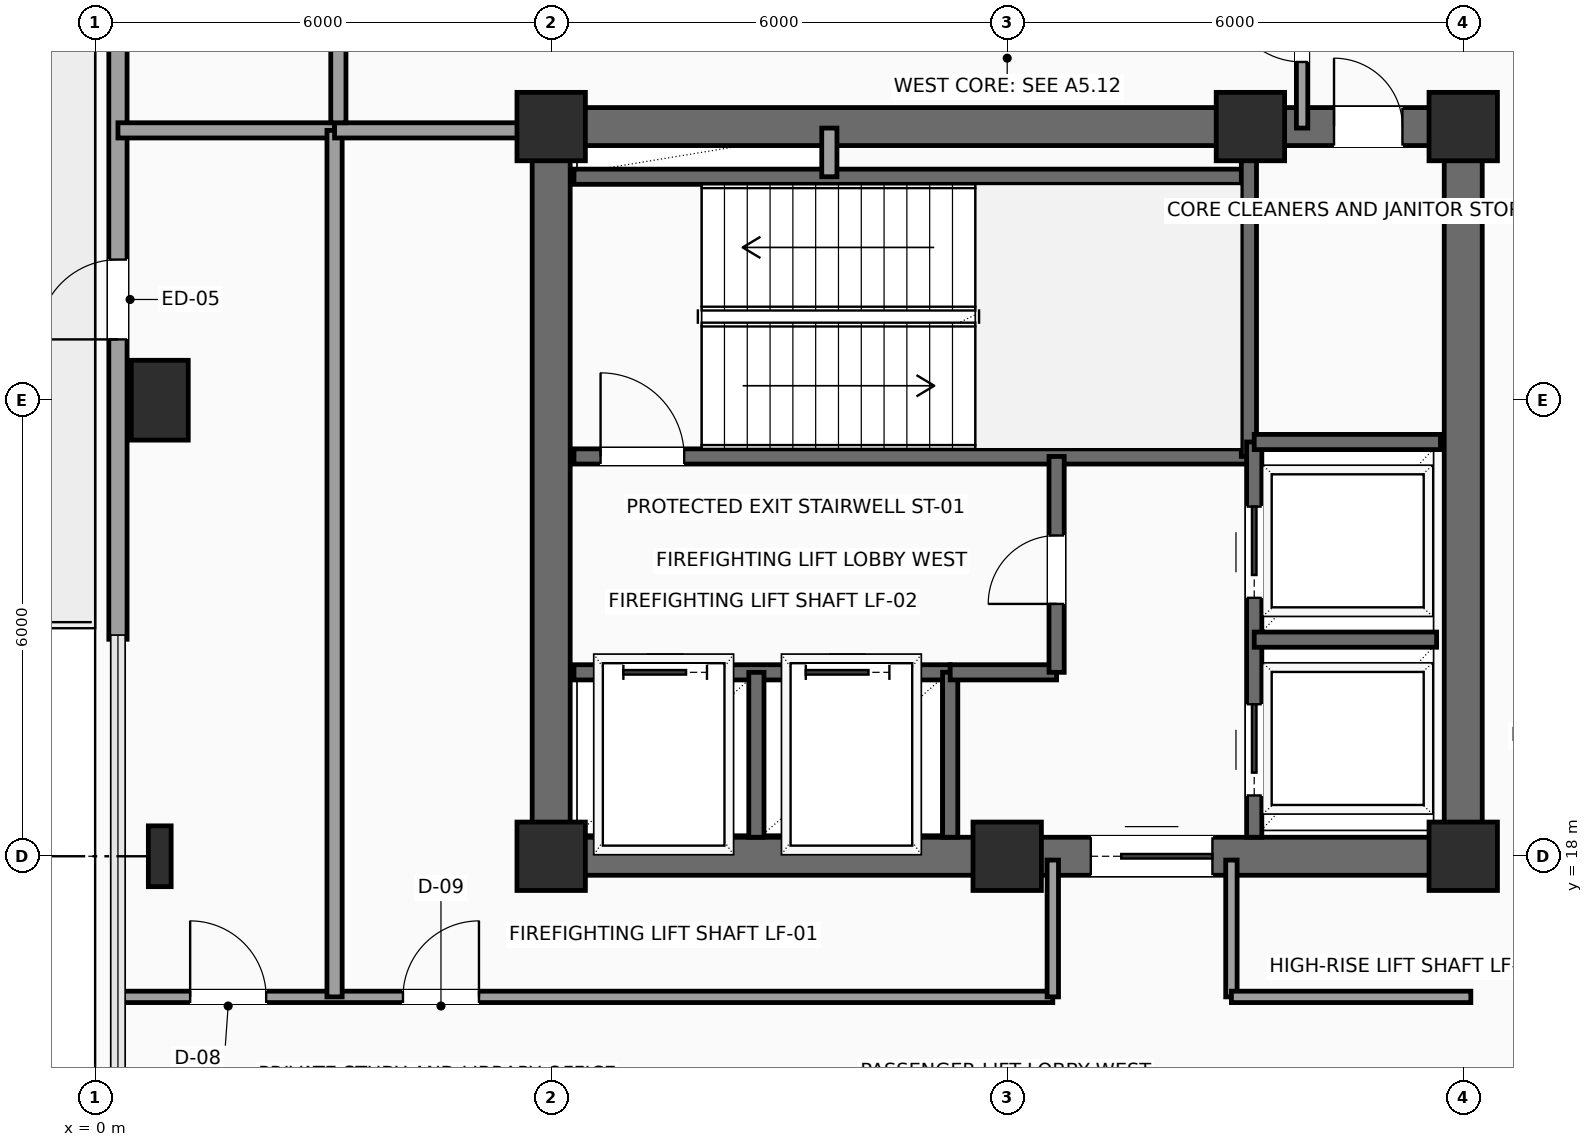
"""IFC4 building model, lengths in metres.
Left out: names, types, materials, properties, quantities, classifications, styles, units other than length and angle.
Written with IfcOpenShell. Run it as: python <this file> out.ifc"""

import sys

from ifc_helpers import new_model, si_unit, direction, frame, frame_2d, origin, origin_2d, place, context, subcontext, project, spatial, rectangle, i_section, extrude, element, fill, save


model = new_model("IFC4")
c1 = context("Model", 3, precision=1e-05, world=origin(), true_north=direction((0.0, 1.0)))
c2 = subcontext(c1, "Body", "Model", "MODEL_VIEW")
j1 = project(units=[si_unit("LENGTHUNIT", "METRE"), si_unit("PLANEANGLEUNIT", "RADIAN")], contexts=[c1])
p1 = place(None, origin())
s1 = spatial("IfcSite", under=j1, at=p1, CompositionType="ELEMENT")
p2 = place(p1, origin())
s2 = spatial("IfcBuilding", under=s1, at=p2, CompositionType="ELEMENT")
p3 = place(p2, frame((0.0, 0.0, 227.4)))
s3 = spatial("IfcBuildingStorey", under=s2, at=p3, CompositionType="ELEMENT", Elevation=227.4)
for number, where, z_axis, x_axis in (
    (1, (6.0, 18.0, 0.0), (0.0, 0.0, 1.0), (1.0, 0.0, 0.0)),
    (2, (12.0, 18.0, 0.0), (0.0, 0.0, 1.0), (1.0, 0.0, 0.0)),
    (3, (18.0, 18.0, 0.0), (0.0, 0.0, 1.0), (1.0, 0.0, 0.0)),
    (4, (6.0, 27.6, 0.0), (0.0, 0.0, 1.0), (1.0, 0.0, 0.0)),
    (5, (15.2, 27.6, 0.0), (0.0, 0.0, 1.0), (1.0, 0.0, 0.0)),
    (6, (18.0, 27.6, 0.0), (0.0, 0.0, 1.0), (1.0, 0.0, 0.0)),
):
    element("IfcColumn", number, at=place(p3, frame(where, z_axis=z_axis, x_axis=x_axis)), inside=s3, PredefinedType="COLUMN", context=c2, shape_type="SweptSolid", body=[
        extrude(rectangle(XDim=0.9, YDim=0.9, at=origin_2d()), origin(), (0.0, 0.0, 1.0), 3.75),
    ])
p4 = place(p3, frame((0.85, 18.0, 0.0), z_axis=(0.0, 0.0, 1.0), x_axis=(1.0, 0.0, 0.0)))
e7 = element("IfcColumn", 7, at=p4, inside=s3, PredefinedType="COLUMN", context=c2, shape_type="SweptSolid", body=[
    extrude(i_section(OverallWidth=0.3, OverallDepth=0.8, WebThickness=0.018, FlangeThickness=0.033, FilletRadius=0.03, at=origin_2d()), origin(), (0.0, 0.0, 1.0), 3.75),
])
p5 = place(p3, frame((0.85, 24.0, 0.0), z_axis=(0.0, 0.0, 1.0), x_axis=(1.0, 0.0, 0.0)))
e8 = element("IfcColumn", 8, at=p5, inside=s3, PredefinedType="COLUMN", context=c2, shape_type="SweptSolid", body=[
    extrude(rectangle(XDim=0.75, YDim=1.05, at=origin_2d()), origin(), (0.0, 0.0, 1.0), 3.75),
])
p6 = place(p3, frame((0.3, 20.855, 0.0), z_axis=(0.0, 0.0, 1.0), x_axis=(0.0, 1.0, 0.0)))
e9 = element("IfcWall", 9, at=p6, inside=s3, PredefinedType="SOLIDWALL", context=c2, shape_type="SweptSolid", body=[
    extrude(rectangle(XDim=9.29, YDim=0.24, at=frame_2d((4.645, 0.0))), origin(), (0.0, 0.0, 1.0), 3.54),
])
p7 = place(p6, frame((3.945, 0.0, 0.0)))
e10 = element("IfcOpeningElement", 10, at=p7, cuts=e9, PredefinedType="OPENING", context=c2, shape_type="SweptSolid", body=[
    extrude(rectangle(XDim=1.05, YDim=2.2, at=frame_2d((0.525, 1.1))), frame((0.0, 0.13, 0.0), z_axis=(0.0, -1.0, 0.0), x_axis=(1.0, 0.0, 0.0)), (0.0, 0.0, 1.0), 0.26),
])
p8 = place(p3, frame((6.0, 18.0, 0.0), z_axis=(0.0, 0.0, 1.0), x_axis=(1.0, 0.0, 0.0)))
e11 = element("IfcWall", 11, at=p8, inside=s3, PredefinedType="SHEAR", context=c2, shape_type="SweptSolid", body=[
    extrude(rectangle(XDim=12.0, YDim=0.5, at=frame_2d((6.0, 0.0))), origin(), (0.0, 0.0, 1.0), 3.54),
])
p9 = place(p8, frame((7.1, 0.0, 0.0)))
e12 = element("IfcOpeningElement", 12, at=p9, cuts=e11, PredefinedType="OPENING", context=c2, shape_type="SweptSolid", body=[
    extrude(rectangle(XDim=1.6, YDim=2.3, at=frame_2d((0.8, 1.15))), frame((0.0, 0.26, 0.0), z_axis=(0.0, -1.0, 0.0), x_axis=(1.0, 0.0, 0.0)), (0.0, 0.0, 1.0), 0.52),
])
p10 = place(p3, frame((6.0, 27.6, 0.0), z_axis=(0.0, 0.0, 1.0), x_axis=(1.0, 0.0, 0.0)))
e13 = element("IfcWall", 13, at=p10, inside=s3, PredefinedType="SHEAR", context=c2, shape_type="SweptSolid", body=[
    extrude(rectangle(XDim=12.0, YDim=0.5, at=frame_2d((6.0, 0.0))), origin(), (0.0, 0.0, 1.0), 3.54),
])
p11 = place(p10, frame((10.3, 0.0, 0.0)))
e14 = element("IfcOpeningElement", 14, at=p11, cuts=e13, PredefinedType="OPENING", context=c2, shape_type="SweptSolid", body=[
    extrude(rectangle(XDim=0.9, YDim=2.15, at=frame_2d((0.45, 1.075))), frame((0.0, 0.26, 0.0), z_axis=(0.0, -1.0, 0.0), x_axis=(1.0, 0.0, 0.0)), (0.0, 0.0, 1.0), 0.52),
])
for number, where, z_axis, x_axis in (
    (15, (6.0, 18.0, 0.0), (0.0, 0.0, 1.0), (0.0, 1.0, 0.0)),
    (16, (18.0, 18.0, 0.0), (0.0, 0.0, 1.0), (0.0, 1.0, 0.0)),
):
    element("IfcWall", number, at=place(p3, frame(where, z_axis=z_axis, x_axis=x_axis)), inside=s3, PredefinedType="SHEAR", context=c2, shape_type="SweptSolid", body=[
        extrude(rectangle(XDim=9.6, YDim=0.5, at=frame_2d((4.8, 0.0))), origin(), (0.0, 0.0, 1.0), 3.54),
    ])
p12 = place(p3, frame((6.3, 23.26, 0.0), z_axis=(0.0, 0.0, 1.0), x_axis=(1.0, 0.0, 0.0)))
e17 = element("IfcWall", 17, at=p12, inside=s3, PredefinedType="SHEAR", context=c2, shape_type="SweptSolid", body=[
    extrude(rectangle(XDim=8.88, YDim=0.2, at=frame_2d((4.44, 0.0))), origin(), (0.0, 0.0, 1.0), 3.54),
])
p13 = place(p12, frame((0.35, 0.0, 0.0)))
e18 = element("IfcOpeningElement", 18, at=p13, cuts=e17, PredefinedType="OPENING", context=c2, shape_type="SweptSolid", body=[
    extrude(rectangle(XDim=1.1, YDim=2.2, at=frame_2d((0.55, 1.1))), frame((0.0, 0.11, 0.0), z_axis=(0.0, -1.0, 0.0), x_axis=(1.0, 0.0, 0.0)), (0.0, 0.0, 1.0), 0.22),
])
p14 = place(p3, frame((6.3, 26.94, 0.0), z_axis=(0.0, 0.0, 1.0), x_axis=(1.0, 0.0, 0.0)))
e19 = element("IfcWall", 19, at=p14, inside=s3, PredefinedType="SHEAR", context=c2, shape_type="SweptSolid", body=[
    extrude(rectangle(XDim=8.88, YDim=0.2, at=frame_2d((4.44, 0.0))), origin(), (0.0, 0.0, 1.0), 3.54),
])
p15 = place(p3, frame((15.18, 23.26, 0.0), z_axis=(0.0, 0.0, 1.0), x_axis=(0.0, 1.0, 0.0)))
e20 = element("IfcWall", 20, at=p15, inside=s3, PredefinedType="SHEAR", context=c2, shape_type="SweptSolid", body=[
    extrude(rectangle(XDim=4.04, YDim=0.2, at=frame_2d((2.02, 0.0))), origin(), (0.0, 0.0, 1.0), 3.54),
])
p16 = place(p3, frame((6.3, 20.42, 0.0), z_axis=(0.0, 0.0, 1.0), x_axis=(1.0, 0.0, 0.0)))
e21 = element("IfcWall", 21, at=p16, inside=s3, PredefinedType="SHEAR", context=c2, shape_type="SweptSolid", body=[
    extrude(rectangle(XDim=4.95, YDim=0.2, at=frame_2d((2.475, 0.0))), origin(), (0.0, 0.0, 1.0), 3.54),
])
p17 = place(p16, frame((0.65, 0.0, 0.0)))
e22 = element("IfcOpeningElement", 22, at=p17, cuts=e21, PredefinedType="OPENING", context=c2, shape_type="SweptSolid", body=[
    extrude(rectangle(XDim=1.1, YDim=2.2, at=frame_2d((0.55, 1.1))), frame((0.0, 0.11, 0.0), z_axis=(0.0, -1.0, 0.0), x_axis=(1.0, 0.0, 0.0)), (0.0, 0.0, 1.0), 0.22),
])
p18 = place(p16, frame((3.05, 0.0, 0.0)))
e23 = element("IfcOpeningElement", 23, at=p18, cuts=e21, PredefinedType="OPENING", context=c2, shape_type="SweptSolid", body=[
    extrude(rectangle(XDim=1.1, YDim=2.2, at=frame_2d((0.55, 1.1))), frame((0.0, 0.11, 0.0), z_axis=(0.0, -1.0, 0.0), x_axis=(1.0, 0.0, 0.0)), (0.0, 0.0, 1.0), 0.22),
])
for number, where, z_axis, x_axis in (
    (24, (8.7, 18.25, 0.0), (0.0, 0.0, 1.0), (0.0, 1.0, 0.0)),
    (25, (11.25, 18.25, 0.0), (0.0, 0.0, 1.0), (0.0, 1.0, 0.0)),
):
    element("IfcWall", number, at=place(p3, frame(where, z_axis=z_axis, x_axis=x_axis)), inside=s3, PredefinedType="SHEAR", context=c2, shape_type="SweptSolid", body=[
        extrude(rectangle(XDim=2.17, YDim=0.2, at=frame_2d((1.085, 0.0))), origin(), (0.0, 0.0, 1.0), 3.54),
    ])
p19 = place(p3, frame((11.25, 20.42, 0.0), z_axis=(0.0, 0.0, 1.0), x_axis=(1.0, 0.0, 0.0)))
e26 = element("IfcWall", 26, at=p19, inside=s3, PredefinedType="SHEAR", context=c2, shape_type="SweptSolid", body=[
    extrude(rectangle(XDim=1.4, YDim=0.2, at=frame_2d((0.7, 0.0))), origin(), (0.0, 0.0, 1.0), 3.54),
])
p20 = place(p3, frame((12.65, 20.42, 0.0), z_axis=(0.0, 0.0, 1.0), x_axis=(0.0, 1.0, 0.0)))
e27 = element("IfcWall", 27, at=p20, inside=s3, PredefinedType="SHEAR", context=c2, shape_type="SweptSolid", body=[
    extrude(rectangle(XDim=2.84, YDim=0.2, at=frame_2d((1.42, 0.0))), origin(), (0.0, 0.0, 1.0), 3.54),
])
p21 = place(p20, frame((0.9, 0.0, 0.0)))
e28 = element("IfcOpeningElement", 28, at=p21, cuts=e27, PredefinedType="OPENING", context=c2, shape_type="SweptSolid", body=[
    extrude(rectangle(XDim=0.9, YDim=2.15, at=frame_2d((0.45, 1.075))), frame((0.0, 0.11, 0.0), z_axis=(0.0, -1.0, 0.0), x_axis=(1.0, 0.0, 0.0)), (0.0, 0.0, 1.0), 0.22),
])
p22 = place(p3, frame((9.66, 26.94, 0.0), z_axis=(0.0, 0.0, 1.0), x_axis=(0.0, 1.0, 0.0)))
e29 = element("IfcWall", 29, at=p22, inside=s3, PredefinedType="SOLIDWALL", context=c2, shape_type="SweptSolid", body=[
    extrude(rectangle(XDim=0.64, YDim=0.2, at=frame_2d((0.32, 0.0))), origin(), (0.0, 0.0, 1.0), 3.54),
])
p23 = place(p3, frame((15.25, 18.25, 0.0), z_axis=(0.0, 0.0, 1.0), x_axis=(0.0, 1.0, 0.0)))
e30 = element("IfcWall", 30, at=p23, inside=s3, PredefinedType="SHEAR", context=c2, shape_type="SweptSolid", body=[
    extrude(rectangle(XDim=5.2, YDim=0.2, at=frame_2d((2.6, 0.0))), origin(), (0.0, 0.0, 1.0), 3.54),
])
p24 = place(p23, frame((0.55, 0.0, 0.0)))
e31 = element("IfcOpeningElement", 31, at=p24, cuts=e30, PredefinedType="OPENING", context=c2, shape_type="SweptSolid", body=[
    extrude(rectangle(XDim=1.2, YDim=2.2, at=frame_2d((0.6, 1.1))), frame((0.0, 0.11, 0.0), z_axis=(0.0, -1.0, 0.0), x_axis=(1.0, 0.0, 0.0)), (0.0, 0.0, 1.0), 0.22),
])
p25 = place(p23, frame((3.15, 0.0, 0.0)))
e32 = element("IfcOpeningElement", 32, at=p25, cuts=e30, PredefinedType="OPENING", context=c2, shape_type="SweptSolid", body=[
    extrude(rectangle(XDim=1.2, YDim=2.2, at=frame_2d((0.6, 1.1))), frame((0.0, 0.11, 0.0), z_axis=(0.0, -1.0, 0.0), x_axis=(1.0, 0.0, 0.0)), (0.0, 0.0, 1.0), 0.22),
])
p26 = place(p3, frame((15.25, 20.85, 0.0), z_axis=(0.0, 0.0, 1.0), x_axis=(1.0, 0.0, 0.0)))
e33 = element("IfcWall", 33, at=p26, inside=s3, PredefinedType="SHEAR", context=c2, shape_type="SweptSolid", body=[
    extrude(rectangle(XDim=2.4, YDim=0.2, at=frame_2d((1.2, 0.0))), origin(), (0.0, 0.0, 1.0), 3.54),
])
p27 = place(p3, frame((15.25, 23.45, 0.0), z_axis=(0.0, 0.0, 1.0), x_axis=(1.0, 0.0, 0.0)))
e34 = element("IfcWall", 34, at=p27, inside=s3, PredefinedType="SHEAR", context=c2, shape_type="SweptSolid", body=[
    extrude(rectangle(XDim=2.45, YDim=0.2, at=frame_2d((1.225, 0.0))), origin(), (0.0, 0.0, 1.0), 3.54),
])
p28 = place(p3, frame((0.3, 16.15, 0.0), z_axis=(0.0, 0.0, 1.0), x_axis=(1.0, 0.0, 0.0)))
e35 = element("IfcWall", 35, at=p28, inside=s3, PredefinedType="PARTITIONING", context=c2, shape_type="SweptSolid", body=[
    extrude(rectangle(XDim=12.3, YDim=0.15, at=frame_2d((6.15, 0.0))), origin(), (0.0, 0.0, 1.0), 3.54),
])
p29 = place(p28, frame((0.95, 0.0, 0.0)))
e36 = element("IfcOpeningElement", 36, at=p29, cuts=e35, PredefinedType="OPENING", context=c2, shape_type="SweptSolid", body=[
    extrude(rectangle(XDim=1.0, YDim=2.2, at=frame_2d((0.5, 1.1))), frame((0.0, 0.085, 0.0), z_axis=(0.0, -1.0, 0.0), x_axis=(1.0, 0.0, 0.0)), (0.0, 0.0, 1.0), 0.17),
])
p30 = place(p28, frame((3.75, 0.0, 0.0)))
e37 = element("IfcOpeningElement", 37, at=p30, cuts=e35, PredefinedType="OPENING", context=c2, shape_type="SweptSolid", body=[
    extrude(rectangle(XDim=1.0, YDim=2.2, at=frame_2d((0.5, 1.1))), frame((0.0, 0.085, 0.0), z_axis=(0.0, -1.0, 0.0), x_axis=(1.0, 0.0, 0.0)), (0.0, 0.0, 1.0), 0.17),
])
for number, where, z_axis, x_axis in (
    (38, (12.6, 16.15, 0.0), (0.0, 0.0, 1.0), (0.0, 1.0, 0.0)),
    (39, (14.95, 17.95, 0.0), (0.0, 0.0, 1.0), (0.0, -1.0, 0.0)),
):
    element("IfcWall", number, at=place(p3, frame(where, z_axis=z_axis, x_axis=x_axis)), inside=s3, PredefinedType="PARTITIONING", context=c2, shape_type="SweptSolid", body=[
        extrude(rectangle(XDim=1.8, YDim=0.15, at=frame_2d((0.9, 0.0))), origin(), (0.0, 0.0, 1.0), 3.54),
    ])
p31 = place(p3, frame((14.95, 16.15, 0.0), z_axis=(0.0, 0.0, 1.0), x_axis=(1.0, 0.0, 0.0)))
e40 = element("IfcWall", 40, at=p31, inside=s3, PredefinedType="PARTITIONING", context=c2, shape_type="SweptSolid", body=[
    extrude(rectangle(XDim=3.15, YDim=0.15, at=frame_2d((1.575, 0.0))), origin(), (0.0, 0.0, 1.0), 3.54),
])
p32 = place(p3, frame((15.88, 27.58, 0.0), z_axis=(0.0, 0.0, 1.0), x_axis=(0.0, 1.0, 0.0)))
e41 = element("IfcWall", 41, at=p32, inside=s3, PredefinedType="PARTITIONING", context=c2, shape_type="SweptSolid", body=[
    extrude(rectangle(XDim=2.67, YDim=0.15, at=frame_2d((1.335, 0.0))), origin(), (0.0, 0.0, 1.0), 3.54),
])
p33 = place(p32, frame((0.87, 0.0, 0.0)))
e42 = element("IfcOpeningElement", 42, at=p33, cuts=e41, PredefinedType="OPENING", context=c2, shape_type="SweptSolid", body=[
    extrude(rectangle(XDim=1.0, YDim=2.2, at=frame_2d((0.5, 1.1))), frame((0.0, 0.085, 0.0), z_axis=(0.0, -1.0, 0.0), x_axis=(1.0, 0.0, 0.0)), (0.0, 0.0, 1.0), 0.17),
])
p34 = place(p3, frame((0.3, 27.55, 0.0), z_axis=(0.0, 0.0, 1.0), x_axis=(1.0, 0.0, 0.0)))
e43 = element("IfcWall", 43, at=p34, inside=s3, PredefinedType="PARTITIONING", context=c2, shape_type="SweptSolid", body=[
    extrude(rectangle(XDim=2.85, YDim=0.2, at=frame_2d((1.425, 0.0))), origin(), (0.0, 0.0, 1.0), 3.54),
])
p35 = place(p3, frame((3.15, 16.15, 0.0), z_axis=(0.0, 0.0, 1.0), x_axis=(0.0, 1.0, 0.0)))
e44 = element("IfcWall", 44, at=p35, inside=s3, PredefinedType="PARTITIONING", context=c2, shape_type="SweptSolid", body=[
    extrude(rectangle(XDim=11.4, YDim=0.2, at=frame_2d((5.7, 0.0))), origin(), (0.0, 0.0, 1.0), 3.54),
])
p36 = place(p3, frame((3.15, 27.55, 0.0), z_axis=(0.0, 0.0, 1.0), x_axis=(1.0, 0.0, 0.0)))
e45 = element("IfcWall", 45, at=p36, inside=s3, PredefinedType="PARTITIONING", context=c2, shape_type="SweptSolid", body=[
    extrude(rectangle(XDim=2.8, YDim=0.2, at=frame_2d((1.4, 0.0))), origin(), (0.0, 0.0, 1.0), 3.54),
])
p37 = place(p3, frame((3.2, 27.65, 0.0), z_axis=(0.0, 0.0, 1.0), x_axis=(0.0, 1.0, 0.0)))
e46 = element("IfcWall", 46, at=p37, inside=s3, PredefinedType="PARTITIONING", context=c2, shape_type="SweptSolid", body=[
    extrude(rectangle(XDim=3.55, YDim=0.2, at=frame_2d((1.775, 0.0))), origin(), (0.0, 0.0, 1.0), 3.54),
])
p38 = place(p7, origin())
e47 = element("IfcDoor", 47, at=p38, inside=s3, OperationType="SINGLE_SWING_LEFT", PredefinedType="DOOR", context=c2, shape_type="SweptSolid", body=[
    extrude(rectangle(XDim=1.05, YDim=2.2, at=frame_2d((0.525, 1.1))), frame((0.0, 0.025, 0.0), z_axis=(0.0, -1.0, 0.0), x_axis=(1.0, 0.0, 0.0)), (0.0, 0.0, 1.0), 0.05),
])
fill(e10, e47)
p39 = place(p9, origin())
e48 = element("IfcDoor", 48, at=p39, inside=s3, OperationType="DOUBLE_DOOR_SLIDING", PredefinedType="DOOR", context=c2, shape_type="SweptSolid", body=[
    extrude(rectangle(XDim=1.6, YDim=2.3, at=frame_2d((0.8, 1.15))), frame((0.0, 0.025, 0.0), z_axis=(0.0, -1.0, 0.0), x_axis=(1.0, 0.0, 0.0)), (0.0, 0.0, 1.0), 0.05),
])
fill(e12, e48)
p40 = place(p11, origin())
e49 = element("IfcDoor", 49, at=p40, inside=s3, OperationType="SINGLE_SWING_LEFT", PredefinedType="DOOR", context=c2, shape_type="SweptSolid", body=[
    extrude(rectangle(XDim=0.9, YDim=2.15, at=frame_2d((0.45, 1.075))), frame((0.0, 0.025, 0.0), z_axis=(0.0, -1.0, 0.0), x_axis=(1.0, 0.0, 0.0)), (0.0, 0.0, 1.0), 0.05),
])
fill(e14, e49)
p41 = place(p13, origin())
e50 = element("IfcDoor", 50, at=p41, inside=s3, OperationType="SINGLE_SWING_LEFT", PredefinedType="DOOR", context=c2, shape_type="SweptSolid", body=[
    extrude(rectangle(XDim=1.1, YDim=2.2, at=frame_2d((0.55, 1.1))), frame((0.0, 0.025, 0.0), z_axis=(0.0, -1.0, 0.0), x_axis=(1.0, 0.0, 0.0)), (0.0, 0.0, 1.0), 0.05),
])
fill(e18, e50)
p42 = place(p17, origin())
e51 = element("IfcDoor", 51, at=p42, inside=s3, OperationType="SLIDING_TO_LEFT", PredefinedType="DOOR", context=c2, shape_type="SweptSolid", body=[
    extrude(rectangle(XDim=1.1, YDim=2.2, at=frame_2d((0.55, 1.1))), frame((0.0, 0.025, 0.0), z_axis=(0.0, -1.0, 0.0), x_axis=(1.0, 0.0, 0.0)), (0.0, 0.0, 1.0), 0.05),
])
fill(e22, e51)
p43 = place(p18, origin())
e52 = element("IfcDoor", 52, at=p43, inside=s3, OperationType="SLIDING_TO_LEFT", PredefinedType="DOOR", context=c2, shape_type="SweptSolid", body=[
    extrude(rectangle(XDim=1.1, YDim=2.2, at=frame_2d((0.55, 1.1))), frame((0.0, 0.025, 0.0), z_axis=(0.0, -1.0, 0.0), x_axis=(1.0, 0.0, 0.0)), (0.0, 0.0, 1.0), 0.05),
])
fill(e23, e52)
p44 = place(p21, origin())
e53 = element("IfcDoor", 53, at=p44, inside=s3, OperationType="SINGLE_SWING_LEFT", PredefinedType="DOOR", context=c2, shape_type="SweptSolid", body=[
    extrude(rectangle(XDim=0.9, YDim=2.15, at=frame_2d((0.45, 1.075))), frame((0.0, 0.025, 0.0), z_axis=(0.0, -1.0, 0.0), x_axis=(1.0, 0.0, 0.0)), (0.0, 0.0, 1.0), 0.05),
])
fill(e28, e53)
p45 = place(p24, origin())
e54 = element("IfcDoor", 54, at=p45, inside=s3, OperationType="SLIDING_TO_RIGHT", PredefinedType="DOOR", context=c2, shape_type="SweptSolid", body=[
    extrude(rectangle(XDim=1.2, YDim=2.2, at=frame_2d((0.6, 1.1))), frame((0.0, 0.025, 0.0), z_axis=(0.0, -1.0, 0.0), x_axis=(1.0, 0.0, 0.0)), (0.0, 0.0, 1.0), 0.05),
])
fill(e31, e54)
p46 = place(p25, origin())
e55 = element("IfcDoor", 55, at=p46, inside=s3, OperationType="SLIDING_TO_RIGHT", PredefinedType="DOOR", context=c2, shape_type="SweptSolid", body=[
    extrude(rectangle(XDim=1.2, YDim=2.2, at=frame_2d((0.6, 1.1))), frame((0.0, 0.025, 0.0), z_axis=(0.0, -1.0, 0.0), x_axis=(1.0, 0.0, 0.0)), (0.0, 0.0, 1.0), 0.05),
])
fill(e32, e55)
p47 = place(p29, origin())
e56 = element("IfcDoor", 56, at=p47, inside=s3, OperationType="SINGLE_SWING_LEFT", PredefinedType="DOOR", context=c2, shape_type="SweptSolid", body=[
    extrude(rectangle(XDim=1.0, YDim=2.2, at=frame_2d((0.5, 1.1))), frame((0.0, 0.025, 0.0), z_axis=(0.0, -1.0, 0.0), x_axis=(1.0, 0.0, 0.0)), (0.0, 0.0, 1.0), 0.05),
])
fill(e36, e56)
p48 = place(p30, origin())
e57 = element("IfcDoor", 57, at=p48, inside=s3, OperationType="SINGLE_SWING_RIGHT", PredefinedType="DOOR", context=c2, shape_type="SweptSolid", body=[
    extrude(rectangle(XDim=1.0, YDim=2.2, at=frame_2d((0.5, 1.1))), frame((0.0, 0.025, 0.0), z_axis=(0.0, -1.0, 0.0), x_axis=(1.0, 0.0, 0.0)), (0.0, 0.0, 1.0), 0.05),
])
fill(e37, e57)
p49 = place(p33, origin())
e58 = element("IfcDoor", 58, at=p49, inside=s3, OperationType="SINGLE_SWING_RIGHT", PredefinedType="DOOR", context=c2, shape_type="SweptSolid", body=[
    extrude(rectangle(XDim=1.0, YDim=2.2, at=frame_2d((0.5, 1.1))), frame((0.0, 0.025, 0.0), z_axis=(0.0, -1.0, 0.0), x_axis=(1.0, 0.0, 0.0)), (0.0, 0.0, 1.0), 0.05),
])
fill(e42, e58)
save(model, sys.argv[1])
